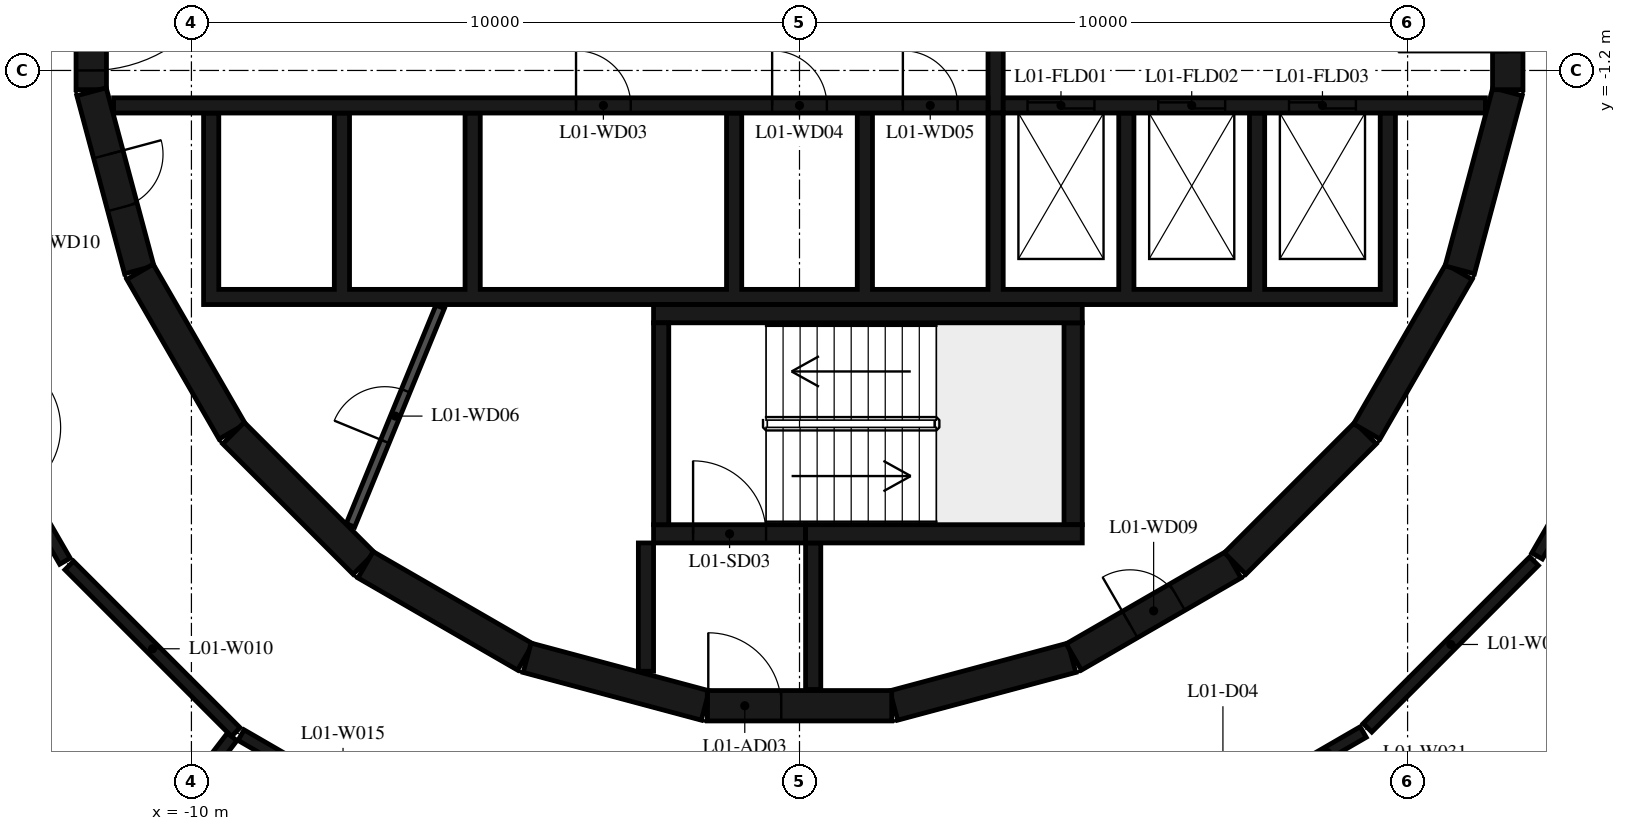
"""IFC4 building model, lengths in metres.
Left out: names, types, materials, properties, quantities, classifications, styles, units other than length and angle.
Written with IfcOpenShell. Run it as: python <this file> out.ifc"""

import sys

from ifc_helpers import new_model, si_unit, direction, frame, frame_2d, origin, place, context, subcontext, project, spatial, polyline, rectangle, outline, extrude, element, fill, save


model = new_model("IFC4")
c1 = context("Model", 3, precision=1e-05, world=origin(), true_north=direction((0.0, 1.0)))
c2 = subcontext(c1, "Body", "Model", "MODEL_VIEW")
j1 = project(units=[si_unit("LENGTHUNIT", "METRE"), si_unit("PLANEANGLEUNIT", "RADIAN")], contexts=[c1])
p1 = place(None, origin())
s1 = spatial("IfcSite", under=j1, at=p1, CompositionType="ELEMENT")
p2 = place(p1, origin())
s2 = spatial("IfcBuilding", under=s1, at=p2, CompositionType="ELEMENT")
p3 = place(p2, frame((0.0, 0.0, 9.0)))
s3 = spatial("IfcBuildingStorey", under=s2, at=p3, CompositionType="ELEMENT", Elevation=9.0)
p4 = place(p3, frame((1.55, -11.643, 0.0), z_axis=(0.0, 0.0, 1.0), x_axis=(0.965948410781, 0.258734743916, 0.0)))
e1 = element("IfcWall", 1, at=p4, inside=s3, PredefinedType="SHEAR", context=c2, shape_type="SweptSolid", body=[
    extrude(rectangle(XDim=3.033, YDim=0.5, at=frame_2d((1.516, 0.0))), origin(), (0.0, 0.0, 1.0), 4.42),
])
p5 = place(p3, frame((4.51, -10.845, 0.0), z_axis=(0.0, 0.0, 1.0), x_axis=(0.865975092491, 0.500087131594, 0.0)))
e2 = element("IfcWall", 2, at=p5, inside=s3, PredefinedType="SHEAR", context=c2, shape_type="SweptSolid", body=[
    extrude(rectangle(XDim=3.033, YDim=0.5, at=frame_2d((1.516, 0.0))), origin(), (0.0, 0.0, 1.0), 4.42),
])
p6 = place(p5, frame((1.066, 0.0, 0.0)))
e3 = element("IfcOpeningElement", 3, at=p6, cuts=e2, PredefinedType="OPENING", context=c2, shape_type="SweptSolid", body=[
    extrude(rectangle(XDim=0.9, YDim=2.1, at=frame_2d((0.45, 1.05))), frame((0.0, 0.26, 0.0), z_axis=(0.0, -1.0, 0.0), x_axis=(1.0, 0.0, 0.0)), (0.0, 0.0, 1.0), 0.52),
])
p7 = place(p3, frame((7.164, -9.308, 0.0), z_axis=(0.0, 0.0, 1.0), x_axis=(0.707106781187, 0.707106781187, 0.0)))
e4 = element("IfcWall", 4, at=p7, inside=s3, PredefinedType="SHEAR", context=c2, shape_type="SweptSolid", body=[
    extrude(rectangle(XDim=3.032, YDim=0.5, at=frame_2d((1.516, 0.0))), origin(), (0.0, 0.0, 1.0), 4.42),
])
for number, where, z_axis, x_axis in (
    (5, (9.329, -7.137, 0.0), (0.0, 0.0, 1.0), (0.5, 0.866, 0.0)),
    (6, (10.858, -4.479, 0.0), (0.0, 0.0, 1.0), (0.259, 0.966, 0.0)),
):
    element("IfcWall", number, at=place(p3, frame(where, z_axis=z_axis, x_axis=x_axis)), inside=s3, PredefinedType="SHEAR", context=c2, shape_type="SweptSolid", body=[
        extrude(rectangle(XDim=3.033, YDim=0.5, at=frame_2d((1.516, 0.0))), origin(), (0.0, 0.0, 1.0), 4.42),
    ])
p8 = place(p3, frame((11.647, -1.516, 0.0), z_axis=(0.0, 0.0, 1.0), x_axis=(0.0, 1.0, 0.0)))
e7 = element("IfcWall", 7, at=p8, inside=s3, PredefinedType="SHEAR", context=c2, shape_type="SweptSolid", body=[
    extrude(rectangle(XDim=3.033, YDim=0.5, at=frame_2d((1.516, 0.0))), origin(), (0.0, 0.0, 1.0), 4.42),
])
p9 = place(p8, frame((0.616, 0.0, 0.0)))
e8 = element("IfcOpeningElement", 8, at=p9, cuts=e7, PredefinedType="OPENING", context=c2, shape_type="SweptSolid", body=[
    extrude(rectangle(XDim=1.8, YDim=2.1, at=frame_2d((0.9, 1.05))), frame((0.0, 0.26, 0.0), z_axis=(0.0, -1.0, 0.0), x_axis=(1.0, 0.0, 0.0)), (0.0, 0.0, 1.0), 0.52),
])
p10 = place(p3, frame((-11.647, 1.516, 0.0), z_axis=(0.0, 0.0, 1.0), x_axis=(0.0, -1.0, 0.0)))
e9 = element("IfcWall", 9, at=p10, inside=s3, PredefinedType="SHEAR", context=c2, shape_type="SweptSolid", body=[
    extrude(rectangle(XDim=3.033, YDim=0.5, at=frame_2d((1.516, 0.0))), origin(), (0.0, 0.0, 1.0), 4.42),
])
p11 = place(p10, frame((0.316, 0.0, 0.0)))
e10 = element("IfcOpeningElement", 10, at=p11, cuts=e9, PredefinedType="OPENING", context=c2, shape_type="SweptSolid", body=[
    extrude(rectangle(XDim=2.4, YDim=2.1, at=frame_2d((1.2, 1.05))), frame((0.0, 0.26, 0.0), z_axis=(0.0, -1.0, 0.0), x_axis=(1.0, 0.0, 0.0)), (0.0, 0.0, 1.0), 0.52),
])
p12 = place(p3, frame((-11.643, -1.55, 0.0), z_axis=(0.0, 0.0, 1.0), x_axis=(0.258734743916, -0.965948410781, 0.0)))
e11 = element("IfcWall", 11, at=p12, inside=s3, PredefinedType="SHEAR", context=c2, shape_type="SweptSolid", body=[
    extrude(rectangle(XDim=3.033, YDim=0.5, at=frame_2d((1.516, 0.0))), origin(), (0.0, 0.0, 1.0), 4.42),
])
p13 = place(p12, frame((1.066, 0.0, 0.0)))
e12 = element("IfcOpeningElement", 12, at=p13, cuts=e11, PredefinedType="OPENING", context=c2, shape_type="SweptSolid", body=[
    extrude(rectangle(XDim=0.9, YDim=2.1, at=frame_2d((0.45, 1.05))), frame((0.0, 0.26, 0.0), z_axis=(0.0, -1.0, 0.0), x_axis=(1.0, 0.0, 0.0)), (0.0, 0.0, 1.0), 0.52),
])
p14 = place(p3, frame((-10.845, -4.51, 0.0), z_axis=(0.0, 0.0, 1.0), x_axis=(0.500087131594, -0.865975092491, 0.0)))
e13 = element("IfcWall", 13, at=p14, inside=s3, PredefinedType="SHEAR", context=c2, shape_type="SweptSolid", body=[
    extrude(rectangle(XDim=3.033, YDim=0.5, at=frame_2d((1.516, 0.0))), origin(), (0.0, 0.0, 1.0), 4.42),
])
p15 = place(p3, frame((-9.308, -7.164, 0.0), z_axis=(0.0, 0.0, 1.0), x_axis=(0.707106781187, -0.707106781187, 0.0)))
e14 = element("IfcWall", 14, at=p15, inside=s3, PredefinedType="SHEAR", context=c2, shape_type="SweptSolid", body=[
    extrude(rectangle(XDim=3.032, YDim=0.5, at=frame_2d((1.516, 0.0))), origin(), (0.0, 0.0, 1.0), 4.42),
])
for number, where, z_axis, x_axis in (
    (15, (-7.137, -9.329, 0.0), (0.0, 0.0, 1.0), (0.866, -0.5, 0.0)),
    (16, (-4.479, -10.858, 0.0), (0.0, 0.0, 1.0), (0.966, -0.259, 0.0)),
):
    element("IfcWall", number, at=place(p3, frame(where, z_axis=z_axis, x_axis=x_axis)), inside=s3, PredefinedType="SHEAR", context=c2, shape_type="SweptSolid", body=[
        extrude(rectangle(XDim=3.033, YDim=0.5, at=frame_2d((1.516, 0.0))), origin(), (0.0, 0.0, 1.0), 4.42),
    ])
p16 = place(p3, frame((-1.516, -11.647, 0.0), z_axis=(0.0, 0.0, 1.0), x_axis=(1.0, 0.0, 0.0)))
e17 = element("IfcWall", 17, at=p16, inside=s3, PredefinedType="SHEAR", context=c2, shape_type="SweptSolid", body=[
    extrude(rectangle(XDim=3.033, YDim=0.5, at=frame_2d((1.516, 0.0))), origin(), (0.0, 0.0, 1.0), 4.42),
])
p17 = place(p16, frame((0.016, 0.0, 0.0)))
e18 = element("IfcOpeningElement", 18, at=p17, cuts=e17, PredefinedType="OPENING", context=c2, shape_type="SweptSolid", body=[
    extrude(rectangle(XDim=1.2, YDim=2.1, at=frame_2d((0.6, 1.05))), frame((0.0, 0.26, 0.0), z_axis=(0.0, -1.0, 0.0), x_axis=(1.0, 0.0, 0.0)), (0.0, 0.0, 1.0), 0.52),
])
p18 = place(p3, frame((-2.275, -8.67, 0.0), z_axis=(0.0, 0.0, 1.0), x_axis=(0.0, 1.0, 0.0)))
e19 = element("IfcWall", 19, at=p18, inside=s3, PredefinedType="SHEAR", context=c2, shape_type="SweptSolid", body=[
    extrude(rectangle(XDim=3.32, YDim=0.25, at=frame_2d((1.66, 0.0))), origin(), (0.0, 0.0, 1.0), 4.42),
])
p19 = place(p3, frame((-2.4, -5.2, 0.0), z_axis=(0.0, 0.0, 1.0), x_axis=(1.0, 0.0, 0.0)))
e20 = element("IfcWall", 20, at=p19, inside=s3, PredefinedType="SHEAR", context=c2, shape_type="SweptSolid", body=[
    extrude(rectangle(XDim=7.05, YDim=0.3, at=frame_2d((3.525, 0.0))), origin(), (0.0, 0.0, 1.0), 4.42),
])
p20 = place(p3, frame((4.5, -8.67, 0.0), z_axis=(0.0, 0.0, 1.0), x_axis=(0.0, 1.0, 0.0)))
e21 = element("IfcWall", 21, at=p20, inside=s3, PredefinedType="SHEAR", context=c2, shape_type="SweptSolid", body=[
    extrude(rectangle(XDim=3.32, YDim=0.3, at=frame_2d((1.66, 0.0))), origin(), (0.0, 0.0, 1.0), 4.42),
])
p21 = place(p3, frame((0.1, -8.82, 0.0), z_axis=(0.0, 0.0, 1.0), x_axis=(1.0, 0.0, 0.0)))
e22 = element("IfcWall", 22, at=p21, inside=s3, PredefinedType="SHEAR", context=c2, shape_type="SweptSolid", body=[
    extrude(rectangle(XDim=4.55, YDim=0.3, at=frame_2d((2.275, 0.0))), origin(), (0.0, 0.0, 1.0), 4.42),
])
p22 = place(p3, frame((-2.4, -8.82, 0.0), z_axis=(0.0, 0.0, 1.0), x_axis=(1.0, 0.0, 0.0)))
e23 = element("IfcWall", 23, at=p22, inside=s3, PredefinedType="SHEAR", context=c2, shape_type="SweptSolid", body=[
    extrude(rectangle(XDim=2.5, YDim=0.3, at=frame_2d((1.25, 0.0))), origin(), (0.0, 0.0, 1.0), 4.42),
])
p23 = place(p22, frame((0.65, 0.0, 0.0)))
e24 = element("IfcOpeningElement", 24, at=p23, cuts=e23, PredefinedType="OPENING", context=c2, shape_type="SweptSolid", body=[
    extrude(rectangle(XDim=1.2, YDim=2.1, at=frame_2d((0.6, 1.05))), frame((0.0, 0.16, 0.0), z_axis=(0.0, -1.0, 0.0), x_axis=(1.0, 0.0, 0.0)), (0.0, 0.0, 1.0), 0.32),
])
p24 = place(p3, frame((-2.525, -8.97, 0.0), z_axis=(0.0, 0.0, 1.0), x_axis=(0.0, -1.0, 0.0)))
e25 = element("IfcWall", 25, at=p24, inside=s3, PredefinedType="SHEAR", context=c2, shape_type="SweptSolid", body=[
    extrude(rectangle(XDim=2.11, YDim=0.25, at=frame_2d((1.055, 0.0))), origin(), (0.0, 0.0, 1.0), 4.42),
])
p25 = place(p3, frame((0.225, -8.97, 0.0), z_axis=(0.0, 0.0, 1.0), x_axis=(0.0, -1.0, 0.0)))
e26 = element("IfcWall", 26, at=p25, inside=s3, PredefinedType="SHEAR", context=c2, shape_type="SweptSolid", body=[
    extrude(rectangle(XDim=2.41, YDim=0.25, at=frame_2d((1.205, 0.0))), origin(), (0.0, 0.0, 1.0), 4.42),
])
p26 = place(p3, origin())
e27 = element("IfcWall", 27, at=p26, inside=s3, PredefinedType="SHEAR", context=c2, shape_type="SweptSolid", body=[
    extrude(outline(polyline([(9.8, -5.05), (9.8, -4.8), (9.8, -1.9), (9.55, -1.9), (9.55, -4.8), (7.65, -4.8), (7.65, -1.9), (7.4, -1.9), (7.4, -4.8), (5.5, -4.8), (5.5, -1.9), (5.25, -1.9), (5.25, -4.8), (3.35, -4.8), (3.35, -1.9), (3.1, -1.9), (3.1, -4.8), (1.2, -4.8), (1.2, -1.9), (0.95, -1.9), (0.95, -4.8), (-0.95, -4.8), (-0.95, -1.9), (-1.2, -1.9), (-1.2, -4.8), (-5.25, -4.8), (-5.25, -1.9), (-5.5, -1.9), (-5.5, -4.8), (-7.4, -4.8), (-7.4, -1.9), (-7.65, -1.9), (-7.65, -4.8), (-9.55, -4.8), (-9.55, -1.9), (-9.8, -1.9), (-9.8, -4.8), (-9.8, -5.05), (9.8, -5.05)])), origin(), (0.0, 0.0, 1.0), 4.42),
])
p27 = place(p3, frame((-11.28, -1.775, 0.0), z_axis=(0.0, 0.0, 1.0), x_axis=(1.0, 0.0, 0.0)))
e28 = element("IfcWall", 28, at=p27, inside=s3, PredefinedType="SHEAR", context=c2, shape_type="SweptSolid", body=[
    extrude(rectangle(XDim=14.38, YDim=0.25, at=frame_2d((7.19, 0.0))), origin(), (0.0, 0.0, 1.0), 4.42),
])
p28 = place(p27, frame((7.605, 0.0, 0.0)))
e29 = element("IfcOpeningElement", 29, at=p28, cuts=e28, PredefinedType="OPENING", context=c2, shape_type="SweptSolid", body=[
    extrude(rectangle(XDim=0.9, YDim=2.1, at=frame_2d((0.45, 1.05))), frame((0.0, 0.135, 0.0), z_axis=(0.0, -1.0, 0.0), x_axis=(1.0, 0.0, 0.0)), (0.0, 0.0, 1.0), 0.27),
])
p29 = place(p27, frame((10.83, 0.0, 0.0)))
e30 = element("IfcOpeningElement", 30, at=p29, cuts=e28, PredefinedType="OPENING", context=c2, shape_type="SweptSolid", body=[
    extrude(rectangle(XDim=0.9, YDim=2.1, at=frame_2d((0.45, 1.05))), frame((0.0, 0.135, 0.0), z_axis=(0.0, -1.0, 0.0), x_axis=(1.0, 0.0, 0.0)), (0.0, 0.0, 1.0), 0.27),
])
p30 = place(p27, frame((12.98, 0.0, 0.0)))
e31 = element("IfcOpeningElement", 31, at=p30, cuts=e28, PredefinedType="OPENING", context=c2, shape_type="SweptSolid", body=[
    extrude(rectangle(XDim=0.9, YDim=2.1, at=frame_2d((0.45, 1.05))), frame((0.0, 0.135, 0.0), z_axis=(0.0, -1.0, 0.0), x_axis=(1.0, 0.0, 0.0)), (0.0, 0.0, 1.0), 0.27),
])
p31 = place(p3, frame((3.35, -1.775, 0.0), z_axis=(0.0, 0.0, 1.0), x_axis=(1.0, 0.0, 0.0)))
e32 = element("IfcWall", 32, at=p31, inside=s3, PredefinedType="SHEAR", context=c2, shape_type="SweptSolid", body=[
    extrude(rectangle(XDim=7.93, YDim=0.25, at=frame_2d((3.965, 0.0))), origin(), (0.0, 0.0, 1.0), 4.42),
])
p32 = place(p31, frame((0.4, 0.0, 0.0)))
e33 = element("IfcOpeningElement", 33, at=p32, cuts=e32, PredefinedType="OPENING", context=c2, shape_type="SweptSolid", body=[
    extrude(rectangle(XDim=1.1, YDim=2.4, at=frame_2d((0.55, 1.2))), frame((0.0, 0.135, 0.0), z_axis=(0.0, -1.0, 0.0), x_axis=(1.0, 0.0, 0.0)), (0.0, 0.0, 1.0), 0.27),
])
p33 = place(p31, frame((2.55, 0.0, 0.0)))
e34 = element("IfcOpeningElement", 34, at=p33, cuts=e32, PredefinedType="OPENING", context=c2, shape_type="SweptSolid", body=[
    extrude(rectangle(XDim=1.1, YDim=2.4, at=frame_2d((0.55, 1.2))), frame((0.0, 0.135, 0.0), z_axis=(0.0, -1.0, 0.0), x_axis=(1.0, 0.0, 0.0)), (0.0, 0.0, 1.0), 0.27),
])
p34 = place(p31, frame((4.7, 0.0, 0.0)))
e35 = element("IfcOpeningElement", 35, at=p34, cuts=e32, PredefinedType="OPENING", context=c2, shape_type="SweptSolid", body=[
    extrude(rectangle(XDim=1.1, YDim=2.4, at=frame_2d((0.55, 1.2))), frame((0.0, 0.135, 0.0), z_axis=(0.0, -1.0, 0.0), x_axis=(1.0, 0.0, 0.0)), (0.0, 0.0, 1.0), 0.27),
])
p35 = place(p3, frame((3.225, -1.9, 0.0), z_axis=(0.0, 0.0, 1.0), x_axis=(0.0, 1.0, 0.0)))
e36 = element("IfcWall", 36, at=p35, inside=s3, PredefinedType="SHEAR", context=c2, shape_type="SweptSolid", body=[
    extrude(rectangle(XDim=3.8, YDim=0.25, at=frame_2d((1.9, 0.0))), origin(), (0.0, 0.0, 1.0), 4.42),
])
p36 = place(p3, frame((-7.385, -8.681, 0.0), z_axis=(0.0, 0.0, 1.0), x_axis=(0.379804590409, 0.925066739811, 0.0)))
e37 = element("IfcWall", 37, at=p36, inside=s3, PredefinedType="PARTITIONING", context=c2, shape_type="SweptSolid", body=[
    extrude(rectangle(XDim=3.885, YDim=0.15, at=frame_2d((1.942, 0.0))), origin(), (0.0, 0.0, 1.0), 4.42),
])
p37 = place(p36, frame((1.493, 0.0, 0.0)))
e38 = element("IfcOpeningElement", 38, at=p37, cuts=e37, PredefinedType="OPENING", context=c2, shape_type="SweptSolid", body=[
    extrude(rectangle(XDim=0.9, YDim=2.1, at=frame_2d((0.45, 1.05))), frame((0.0, 0.085, 0.0), z_axis=(0.0, -1.0, 0.0), x_axis=(1.0, 0.0, 0.0)), (0.0, 0.0, 1.0), 0.17),
])
p38 = place(p3, frame((-14.02, -5.917, 0.0), z_axis=(0.0, 0.0, 1.0), x_axis=(0.500733182901, -0.865601686425, 0.0)))
e39 = element("IfcWall", 39, at=p38, inside=s3, PredefinedType="PARTITIONING", context=c2, shape_type="SweptSolid", body=[
    extrude(rectangle(XDim=3.874, YDim=0.2, at=frame_2d((1.937, 0.0))), origin(), (0.0, 0.0, 1.0), 4.42),
])
p39 = place(p38, frame((1.337, 0.0, 0.0)))
e40 = element("IfcOpeningElement", 40, at=p39, cuts=e39, PredefinedType="OPENING", context=c2, shape_type="SweptSolid", body=[
    extrude(rectangle(XDim=1.2, YDim=2.1, at=frame_2d((0.6, 1.05))), frame((0.0, 0.11, 0.0), z_axis=(0.0, -1.0, 0.0), x_axis=(1.0, 0.0, 0.0)), (0.0, 0.0, 1.0), 0.22),
])
p40 = place(p3, frame((-12.009, -9.341, 0.0), z_axis=(0.0, 0.0, 1.0), x_axis=(0.707106781187, -0.707106781187, 0.0)))
e41 = element("IfcWall", 41, at=p40, inside=s3, PredefinedType="PARTITIONING", context=c2, shape_type="SweptSolid", body=[
    extrude(rectangle(XDim=3.874, YDim=0.2, at=frame_2d((1.937, 0.0))), origin(), (0.0, 0.0, 1.0), 4.42),
])
p41 = place(p3, frame((-9.331, -12.159, 0.0), z_axis=(0.0, 0.0, 1.0), x_axis=(-0.608558385637, -0.793509099677, 0.0)))
e42 = element("IfcWall", 42, at=p41, inside=s3, PredefinedType="PARTITIONING", context=c2, shape_type="SweptSolid", body=[
    extrude(rectangle(XDim=9.415, YDim=0.2, at=frame_2d((4.707, 0.0))), origin(), (0.0, 0.0, 1.0), 4.42),
])
p42 = place(p3, frame((-9.183, -12.13, 0.0), z_axis=(0.0, 0.0, 1.0), x_axis=(0.865585884642, -0.500760497952, 0.0)))
e43 = element("IfcWall", 43, at=p42, inside=s3, PredefinedType="PARTITIONING", context=c2, shape_type="SweptSolid", body=[
    extrude(rectangle(XDim=3.874, YDim=0.2, at=frame_2d((1.937, 0.0))), origin(), (0.0, 0.0, 1.0), 4.42),
])
p43 = place(p3, frame((8.096, -12.76, 0.0), z_axis=(0.0, 0.0, 1.0), x_axis=(0.865348217229, 0.501171091484, 0.0)))
e44 = element("IfcWall", 44, at=p43, inside=s3, PredefinedType="PARTITIONING", context=c2, shape_type="SweptSolid", body=[
    extrude(rectangle(XDim=1.356, YDim=0.2, at=frame_2d((0.678, 0.0))), origin(), (0.0, 0.0, 1.0), 4.42),
])
p44 = place(p3, frame((9.341, -12.009, 0.0), z_axis=(0.0, 0.0, 1.0), x_axis=(0.707106781187, 0.707106781187, 0.0)))
e45 = element("IfcWall", 45, at=p44, inside=s3, PredefinedType="PARTITIONING", context=c2, shape_type="SweptSolid", body=[
    extrude(rectangle(XDim=3.874, YDim=0.2, at=frame_2d((1.937, 0.0))), origin(), (0.0, 0.0, 1.0), 4.42),
])
p45 = place(p3, frame((12.13, -9.183, 0.0), z_axis=(0.0, 0.0, 1.0), x_axis=(0.500760497952, 0.865585884642, 0.0)))
e46 = element("IfcWall", 46, at=p45, inside=s3, PredefinedType="PARTITIONING", context=c2, shape_type="SweptSolid", body=[
    extrude(rectangle(XDim=3.874, YDim=0.2, at=frame_2d((1.937, 0.0))), origin(), (0.0, 0.0, 1.0), 4.42),
])
p46 = place(p23, origin())
e47 = element("IfcDoor", 47, at=p46, inside=s3, OperationType="SINGLE_SWING_LEFT", PredefinedType="DOOR", context=c2, shape_type="SweptSolid", body=[
    extrude(rectangle(XDim=1.2, YDim=2.1, at=frame_2d((0.6, 1.05))), frame((0.0, 0.025, 0.0), z_axis=(0.0, -1.0, 0.0), x_axis=(1.0, 0.0, 0.0)), (0.0, 0.0, 1.0), 0.05),
])
fill(e24, e47)
p47 = place(p17, origin())
e48 = element("IfcDoor", 48, at=p47, inside=s3, OperationType="SINGLE_SWING_RIGHT", PredefinedType="DOOR", context=c2, shape_type="SweptSolid", body=[
    extrude(rectangle(XDim=1.2, YDim=2.1, at=frame_2d((0.6, 1.05))), frame((0.0, 0.025, 0.0), z_axis=(0.0, -1.0, 0.0), x_axis=(1.0, 0.0, 0.0)), (0.0, 0.0, 1.0), 0.05),
])
fill(e18, e48)
p48 = place(p11, origin())
e49 = element("IfcDoor", 49, at=p48, inside=s3, OperationType="DOUBLE_DOOR_SINGLE_SWING", PredefinedType="DOOR", context=c2, shape_type="SweptSolid", body=[
    extrude(rectangle(XDim=2.4, YDim=2.1, at=frame_2d((1.2, 1.05))), frame((0.0, 0.025, 0.0), z_axis=(0.0, -1.0, 0.0), x_axis=(1.0, 0.0, 0.0)), (0.0, 0.0, 1.0), 0.05),
])
fill(e10, e49)
p49 = place(p9, origin())
e50 = element("IfcDoor", 50, at=p49, inside=s3, OperationType="DOUBLE_DOOR_SINGLE_SWING", PredefinedType="DOOR", context=c2, shape_type="SweptSolid", body=[
    extrude(rectangle(XDim=1.8, YDim=2.1, at=frame_2d((0.9, 1.05))), frame((0.0, 0.025, 0.0), z_axis=(0.0, -1.0, 0.0), x_axis=(1.0, 0.0, 0.0)), (0.0, 0.0, 1.0), 0.05),
])
fill(e8, e50)
p50 = place(p32, origin())
e51 = element("IfcDoor", 51, at=p50, inside=s3, OperationType="DOUBLE_DOOR_SLIDING", PredefinedType="DOOR", context=c2, shape_type="SweptSolid", body=[
    extrude(rectangle(XDim=1.1, YDim=2.4, at=frame_2d((0.55, 1.2))), frame((0.0, 0.025, 0.0), z_axis=(0.0, -1.0, 0.0), x_axis=(1.0, 0.0, 0.0)), (0.0, 0.0, 1.0), 0.05),
])
fill(e33, e51)
p51 = place(p33, origin())
e52 = element("IfcDoor", 52, at=p51, inside=s3, OperationType="DOUBLE_DOOR_SLIDING", PredefinedType="DOOR", context=c2, shape_type="SweptSolid", body=[
    extrude(rectangle(XDim=1.1, YDim=2.4, at=frame_2d((0.55, 1.2))), frame((0.0, 0.025, 0.0), z_axis=(0.0, -1.0, 0.0), x_axis=(1.0, 0.0, 0.0)), (0.0, 0.0, 1.0), 0.05),
])
fill(e34, e52)
p52 = place(p34, origin())
e53 = element("IfcDoor", 53, at=p52, inside=s3, OperationType="DOUBLE_DOOR_SLIDING", PredefinedType="DOOR", context=c2, shape_type="SweptSolid", body=[
    extrude(rectangle(XDim=1.1, YDim=2.4, at=frame_2d((0.55, 1.2))), frame((0.0, 0.025, 0.0), z_axis=(0.0, -1.0, 0.0), x_axis=(1.0, 0.0, 0.0)), (0.0, 0.0, 1.0), 0.05),
])
fill(e35, e53)
p53 = place(p28, origin())
e54 = element("IfcDoor", 54, at=p53, inside=s3, OperationType="SINGLE_SWING_RIGHT", PredefinedType="DOOR", context=c2, shape_type="SweptSolid", body=[
    extrude(rectangle(XDim=0.9, YDim=2.1, at=frame_2d((0.45, 1.05))), frame((0.0, 0.025, 0.0), z_axis=(0.0, -1.0, 0.0), x_axis=(1.0, 0.0, 0.0)), (0.0, 0.0, 1.0), 0.05),
])
fill(e29, e54)
p54 = place(p29, origin())
e55 = element("IfcDoor", 55, at=p54, inside=s3, OperationType="SINGLE_SWING_LEFT", PredefinedType="DOOR", context=c2, shape_type="SweptSolid", body=[
    extrude(rectangle(XDim=0.9, YDim=2.1, at=frame_2d((0.45, 1.05))), frame((0.0, 0.025, 0.0), z_axis=(0.0, -1.0, 0.0), x_axis=(1.0, 0.0, 0.0)), (0.0, 0.0, 1.0), 0.05),
])
fill(e30, e55)
p55 = place(p30, origin())
e56 = element("IfcDoor", 56, at=p55, inside=s3, OperationType="SINGLE_SWING_RIGHT", PredefinedType="DOOR", context=c2, shape_type="SweptSolid", body=[
    extrude(rectangle(XDim=0.9, YDim=2.1, at=frame_2d((0.45, 1.05))), frame((0.0, 0.025, 0.0), z_axis=(0.0, -1.0, 0.0), x_axis=(1.0, 0.0, 0.0)), (0.0, 0.0, 1.0), 0.05),
])
fill(e31, e56)
p56 = place(p37, origin())
e57 = element("IfcDoor", 57, at=p56, inside=s3, OperationType="SINGLE_SWING_LEFT", PredefinedType="DOOR", context=c2, shape_type="SweptSolid", body=[
    extrude(rectangle(XDim=0.9, YDim=2.1, at=frame_2d((0.45, 1.05))), frame((0.0, 0.025, 0.0), z_axis=(0.0, -1.0, 0.0), x_axis=(1.0, 0.0, 0.0)), (0.0, 0.0, 1.0), 0.05),
])
fill(e38, e57)
p57 = place(p6, origin())
e58 = element("IfcDoor", 58, at=p57, inside=s3, OperationType="SINGLE_SWING_RIGHT", PredefinedType="DOOR", context=c2, shape_type="SweptSolid", body=[
    extrude(rectangle(XDim=0.9, YDim=2.1, at=frame_2d((0.45, 1.05))), frame((0.0, 0.025, 0.0), z_axis=(0.0, -1.0, 0.0), x_axis=(1.0, 0.0, 0.0)), (0.0, 0.0, 1.0), 0.05),
])
fill(e3, e58)
p58 = place(p13, origin())
e59 = element("IfcDoor", 59, at=p58, inside=s3, OperationType="SINGLE_SWING_LEFT", PredefinedType="DOOR", context=c2, shape_type="SweptSolid", body=[
    extrude(rectangle(XDim=0.9, YDim=2.1, at=frame_2d((0.45, 1.05))), frame((0.0, 0.025, 0.0), z_axis=(0.0, -1.0, 0.0), x_axis=(1.0, 0.0, 0.0)), (0.0, 0.0, 1.0), 0.05),
])
fill(e12, e59)
save(model, sys.argv[1])
